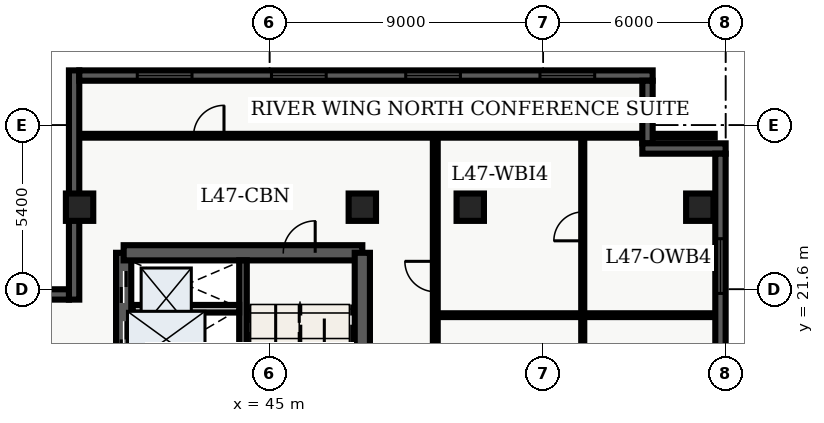
"""IFC4 building model, lengths in metres.
Left out: names, types, materials, properties, quantities, classifications, styles, units other than length and angle.
Written with IfcOpenShell. Run it as: python <this file> out.ifc"""

import sys

from ifc_helpers import new_model, entity, si_unit, converted_unit, direction, frame, origin_with_axes, origin_2d_with_axis, place, context, subcontext, project, spatial, polyline, rectangle, outline, extrude, element, fill, save


model = new_model("IFC4")
c1 = context("Model", 3, precision=1e-05, world=origin_with_axes(), true_north=direction((0.0, 1.0)))
c2 = subcontext(c1, "Body", "Model", "MODEL_VIEW")
j1 = project(units=[si_unit("LENGTHUNIT", "METRE"), converted_unit("PLANEANGLEUNIT", "DEGREE", entity("IfcPlaneAngleMeasure", 0.017), si_unit("PLANEANGLEUNIT", "RADIAN"), dimensions=[0, 0, 0, 0, 0, 0, 0])], contexts=[c1])
p1 = place(None, origin_with_axes())
s1 = spatial("IfcSite", under=j1, at=p1, CompositionType="ELEMENT")
p2 = place(p1, origin_with_axes())
s2 = spatial("IfcBuilding", under=s1, at=p2, CompositionType="ELEMENT")
p3 = place(p2, frame((0.0, 0.0, 192.6), z_axis=(0.0, 0.0, 1.0), x_axis=(1.0, 0.0, 0.0)))
s3 = spatial("IfcBuildingStorey", under=s2, at=p3, CompositionType="ELEMENT", Elevation=192.6)
p4 = place(p3, frame((40.2, 7.2, 0.0), z_axis=(0.0, 0.0, 1.0), x_axis=(0.0, 1.0, 0.0)))
e1 = element("IfcWall", 1, at=p4, inside=s3, PredefinedType="SHEAR", context=c2, shape_type="SweptSolid", body=[
    extrude(outline(polyline([(0.0, -0.25), (15.6, -0.25), (15.6, 0.25), (0.0, 0.25), (0.0, -0.25)])), origin_with_axes(), (0.0, 0.0, 1.0), 3.66),
])
p5 = place(p4, frame((14.475, 0.0, 0.0), z_axis=(0.0, 0.0, 1.0), x_axis=(1.0, 0.0, 0.0)))
e2 = element("IfcOpeningElement", 2, at=p5, cuts=e1, PredefinedType="OPENING", context=c2, shape_type="SweptSolid", body=[
    extrude(rectangle(XDim=1.05, YDim=0.52, at=origin_2d_with_axis()), origin_with_axes(), (0.0, 0.0, 1.0), 2.15),
])
p6 = place(p4, frame((12.75, 0.0, 0.0), z_axis=(0.0, 0.0, 1.0), x_axis=(1.0, 0.0, 0.0)))
e3 = element("IfcOpeningElement", 3, at=p6, cuts=e1, PredefinedType="OPENING", context=c2, shape_type="SweptSolid", body=[
    extrude(rectangle(XDim=1.2, YDim=0.52, at=origin_2d_with_axis()), origin_with_axes(), (0.0, 0.0, 1.0), 2.15),
])
p7 = place(p4, frame((9.3, 0.0, 0.0), z_axis=(0.0, 0.0, 1.0), x_axis=(1.0, 0.0, 0.0)))
e4 = element("IfcOpeningElement", 4, at=p7, cuts=e1, PredefinedType="OPENING", context=c2, shape_type="SweptSolid", body=[
    extrude(rectangle(XDim=0.9, YDim=0.52, at=origin_2d_with_axis()), origin_with_axes(), (0.0, 0.0, 1.0), 2.15),
])
p8 = place(p3, frame((40.2, 22.8, 0.0), z_axis=(0.0, 0.0, 1.0), x_axis=(1.0, 0.0, 0.0)))
e5 = element("IfcWall", 5, at=p8, inside=s3, PredefinedType="SHEAR", context=c2, shape_type="SweptSolid", body=[
    extrude(outline(polyline([(0.0, -0.25), (7.85, -0.25), (7.85, 0.25), (0.0, 0.25), (0.0, -0.25)])), origin_with_axes(), (0.0, 0.0, 1.0), 3.66),
])
p9 = place(p8, frame((5.775, 0.0, 0.0), z_axis=(0.0, 0.0, 1.0), x_axis=(1.0, 0.0, 0.0)))
e6 = element("IfcOpeningElement", 6, at=p9, cuts=e5, PredefinedType="OPENING", context=c2, shape_type="SweptSolid", body=[
    extrude(rectangle(XDim=1.05, YDim=0.52, at=origin_2d_with_axis()), origin_with_axes(), (0.0, 0.0, 1.0), 2.15),
])
p10 = place(p3, frame((48.05, 7.2, 0.0), z_axis=(0.0, 0.0, 1.0), x_axis=(0.0, 1.0, 0.0)))
e7 = element("IfcWall", 7, at=p10, inside=s3, PredefinedType="SHEAR", context=c2, shape_type="SweptSolid", body=[
    extrude(outline(polyline([(0.0, -0.25), (15.6, -0.25), (15.6, 0.25), (0.0, 0.25), (0.0, -0.25)])), origin_with_axes(), (0.0, 0.0, 1.0), 3.66),
])
p11 = place(p10, frame((5.975, 0.0, 0.0), z_axis=(0.0, 0.0, 1.0), x_axis=(1.0, 0.0, 0.0)))
e8 = element("IfcOpeningElement", 8, at=p11, cuts=e7, PredefinedType="OPENING", context=c2, shape_type="SweptSolid", body=[
    extrude(rectangle(XDim=1.05, YDim=0.52, at=origin_2d_with_axis()), origin_with_axes(), (0.0, 0.0, 1.0), 2.15),
])
p12 = place(p10, frame((2.725, 0.0, 0.0), z_axis=(0.0, 0.0, 1.0), x_axis=(1.0, 0.0, 0.0)))
e9 = element("IfcOpeningElement", 9, at=p12, cuts=e7, PredefinedType="OPENING", context=c2, shape_type="SweptSolid", body=[
    extrude(rectangle(XDim=0.95, YDim=0.52, at=origin_2d_with_axis()), origin_with_axes(), (0.0, 0.0, 1.0), 2.15),
])
p13 = place(p3, frame((44.125, 7.45, 0.0), z_axis=(0.0, 0.0, 1.0), x_axis=(0.0, 1.0, 0.0)))
e10 = element("IfcWall", 10, at=p13, inside=s3, PredefinedType="SHEAR", context=c2, shape_type="SweptSolid", body=[
    extrude(outline(polyline([(0.0, -0.125), (15.1, -0.125), (15.1, 0.125), (0.0, 0.125), (0.0, -0.125)])), origin_with_axes(), (0.0, 0.0, 1.0), 3.66),
])
for number, where, z_axis, x_axis in (
    (11, (38.75, 24.3, 0.0), (0.0, 0.0, 1.0), (1.0, 0.0, 0.0)),
    (12, (48.05, 24.3, 0.0), (0.0, 0.0, 1.0), (1.0, 0.0, 0.0)),
    (13, (51.6, 24.3, 0.0), (0.0, 0.0, 1.0), (1.0, 0.0, 0.0)),
    (14, (59.15, 24.3, 0.0), (0.0, 0.0, 1.0), (1.0, 0.0, 0.0)),
):
    element("IfcColumn", number, at=place(p3, frame(where, z_axis=z_axis, x_axis=x_axis)), inside=s3, PredefinedType="COLUMN", context=c2, shape_type="SweptSolid", body=[
        extrude(rectangle(XDim=0.9, YDim=0.9, at=origin_2d_with_axis()), origin_with_axes(), (0.0, 0.0, 1.0), 3.9),
    ])
p14 = place(p3, frame((40.5, 20.96, 0.0), z_axis=(0.0, 0.0, 1.0), x_axis=(1.0, 0.0, 0.0)))
e15 = element("IfcWall", 15, at=p14, inside=s3, PredefinedType="SOLIDWALL", context=c2, shape_type="SweptSolid", body=[
    extrude(outline(polyline([(0.0, -0.125), (3.5, -0.125), (3.5, 0.125), (0.0, 0.125), (0.0, -0.125)])), origin_with_axes(), (0.0, 0.0, 1.0), 2.7),
])
p15 = place(p3, frame((50.45, 7.85, 0.0), z_axis=(0.0, 0.0, 1.0), x_axis=(0.0, 1.0, 0.0)))
e16 = element("IfcWall", 16, at=p15, inside=s3, PredefinedType="PARTITIONING", context=c2, shape_type="SweptSolid", body=[
    extrude(outline(polyline([(0.0, -0.08), (18.8, -0.08), (18.8, 0.08), (0.0, 0.08), (0.0, -0.08)])), origin_with_axes(), (0.0, 0.0, 1.0), 2.7),
])
p16 = place(p15, frame((5.84, 0.0, 0.0), z_axis=(0.0, 0.0, 1.0), x_axis=(1.0, 0.0, 0.0)))
e17 = element("IfcOpeningElement", 17, at=p16, cuts=e16, PredefinedType="OPENING", context=c2, shape_type="SweptSolid", body=[
    extrude(rectangle(XDim=1.0, YDim=0.18, at=origin_2d_with_axis()), origin_with_axes(), (0.0, 0.0, 1.0), 2.15),
])
p17 = place(p15, frame((11.293, 0.0, 0.0), z_axis=(0.0, 0.0, 1.0), x_axis=(1.0, 0.0, 0.0)))
e18 = element("IfcOpeningElement", 18, at=p17, cuts=e16, PredefinedType="OPENING", context=c2, shape_type="SweptSolid", body=[
    extrude(rectangle(XDim=1.0, YDim=0.18, at=origin_2d_with_axis()), origin_with_axes(), (0.0, 0.0, 1.0), 2.15),
])
p18 = place(p15, frame((14.169, 0.0, 0.0), z_axis=(0.0, 0.0, 1.0), x_axis=(1.0, 0.0, 0.0)))
e19 = element("IfcOpeningElement", 19, at=p18, cuts=e16, PredefinedType="OPENING", context=c2, shape_type="SweptSolid", body=[
    extrude(rectangle(XDim=1.0, YDim=0.18, at=origin_2d_with_axis()), origin_with_axes(), (0.0, 0.0, 1.0), 2.15),
])
p19 = place(p3, frame((38.735, 26.65, 0.0), z_axis=(0.0, 0.0, 1.0), x_axis=(1.0, 0.0, 0.0)))
e20 = element("IfcWall", 20, at=p19, inside=s3, PredefinedType="PARTITIONING", context=c2, shape_type="SweptSolid", body=[
    extrude(outline(polyline([(0.0, -0.062), (20.905, -0.062), (20.905, 0.062), (0.0, 0.062), (0.0, -0.062)])), origin_with_axes(), (0.0, 0.0, 1.0), 2.7),
])
p20 = place(p19, frame((4.265, 0.0, 0.0), z_axis=(0.0, 0.0, 1.0), x_axis=(1.0, 0.0, 0.0)))
e21 = element("IfcOpeningElement", 21, at=p20, cuts=e20, PredefinedType="OPENING", context=c2, shape_type="SweptSolid", body=[
    extrude(rectangle(XDim=1.0, YDim=0.145, at=origin_2d_with_axis()), origin_with_axes(), (0.0, 0.0, 1.0), 2.15),
])
p21 = place(p3, frame((55.3, 7.98, 0.0), z_axis=(0.0, 0.0, 1.0), x_axis=(0.0, 1.0, 0.0)))
e22 = element("IfcWall", 22, at=p21, inside=s3, PredefinedType="PARTITIONING", context=c2, shape_type="SweptSolid", body=[
    extrude(outline(polyline([(0.0, -0.05), (18.54, -0.05), (18.54, 0.05), (0.0, 0.05), (0.0, -0.05)])), origin_with_axes(), (0.0, 0.0, 1.0), 2.7),
])
p22 = place(p21, frame((1.776, 0.0, 0.0), z_axis=(0.0, 0.0, 1.0), x_axis=(1.0, 0.0, 0.0)))
e23 = element("IfcOpeningElement", 23, at=p22, cuts=e22, PredefinedType="OPENING", context=c2, shape_type="SweptSolid", body=[
    extrude(rectangle(XDim=0.95, YDim=0.12, at=origin_2d_with_axis()), origin_with_axes(), (0.0, 0.0, 1.0), 2.15),
])
p23 = place(p21, frame((5.71, 0.0, 0.0), z_axis=(0.0, 0.0, 1.0), x_axis=(1.0, 0.0, 0.0)))
e24 = element("IfcOpeningElement", 24, at=p23, cuts=e22, PredefinedType="OPENING", context=c2, shape_type="SweptSolid", body=[
    extrude(rectangle(XDim=0.95, YDim=0.12, at=origin_2d_with_axis()), origin_with_axes(), (0.0, 0.0, 1.0), 2.15),
])
p24 = place(p21, frame((10.283, 0.0, 0.0), z_axis=(0.0, 0.0, 1.0), x_axis=(1.0, 0.0, 0.0)))
e25 = element("IfcOpeningElement", 25, at=p24, cuts=e22, PredefinedType="OPENING", context=c2, shape_type="SweptSolid", body=[
    extrude(rectangle(XDim=0.95, YDim=0.12, at=origin_2d_with_axis()), origin_with_axes(), (0.0, 0.0, 1.0), 2.15),
])
p25 = place(p21, frame((15.689, 0.0, 0.0), z_axis=(0.0, 0.0, 1.0), x_axis=(1.0, 0.0, 0.0)))
e26 = element("IfcOpeningElement", 26, at=p25, cuts=e22, PredefinedType="OPENING", context=c2, shape_type="SweptSolid", body=[
    extrude(rectangle(XDim=0.95, YDim=0.12, at=origin_2d_with_axis()), origin_with_axes(), (0.0, 0.0, 1.0), 2.15),
])
p26 = place(p3, frame((50.57, 20.748, 0.0), z_axis=(0.0, 0.0, 1.0), x_axis=(1.0, 0.0, 0.0)))
e27 = element("IfcWall", 27, at=p26, inside=s3, PredefinedType="PARTITIONING", context=c2, shape_type="SweptSolid", body=[
    extrude(outline(polyline([(0.0, -0.062), (9.095, -0.062), (9.095, 0.062), (0.0, 0.062), (0.0, -0.062)])), origin_with_axes(), (0.0, 0.0, 1.0), 2.7),
])
p27 = place(p3, frame((38.57, 21.26, 0.0), z_axis=(0.0, 0.0, 1.0), x_axis=(0.0, 1.0, 0.0)))
e28 = element("IfcWall", 28, at=p27, inside=s3, PredefinedType="SOLIDWALL", context=c2, shape_type="SweptSolid", body=[
    extrude(outline(polyline([(0.0, -0.17), (7.54, -0.17), (7.54, 0.17), (0.0, 0.17), (0.0, -0.17)])), origin_with_axes(), (0.0, 0.0, 1.0), 3.66),
])
p28 = place(p3, frame((38.74, 28.63, 0.0), z_axis=(0.0, 0.0, 1.0), x_axis=(1.0, 0.0, 0.0)))
e29 = element("IfcWall", 29, at=p28, inside=s3, PredefinedType="SOLIDWALL", context=c2, shape_type="SweptSolid", body=[
    extrude(outline(polyline([(0.0, -0.17), (18.86, -0.17), (18.86, 0.17), (0.0, 0.17), (0.0, -0.17)])), origin_with_axes(), (0.0, 0.0, 1.0), 3.66),
])
p29 = place(p28, frame((2.808, 0.0, 0.45), z_axis=(0.0, 0.0, 1.0), x_axis=(1.0, 0.0, 0.0)))
e30 = element("IfcOpeningElement", 30, at=p29, cuts=e29, PredefinedType="OPENING", context=c2, shape_type="SweptSolid", body=[
    extrude(rectangle(XDim=1.8, YDim=0.36, at=origin_2d_with_axis()), origin_with_axes(), (0.0, 0.0, 1.0), 2.1),
])
p30 = place(p28, frame((7.222, 0.0, 0.45), z_axis=(0.0, 0.0, 1.0), x_axis=(1.0, 0.0, 0.0)))
e31 = element("IfcOpeningElement", 31, at=p30, cuts=e29, PredefinedType="OPENING", context=c2, shape_type="SweptSolid", body=[
    extrude(rectangle(XDim=1.8, YDim=0.36, at=origin_2d_with_axis()), origin_with_axes(), (0.0, 0.0, 1.0), 2.1),
])
p31 = place(p28, frame((11.637, 0.0, 0.45), z_axis=(0.0, 0.0, 1.0), x_axis=(1.0, 0.0, 0.0)))
e32 = element("IfcOpeningElement", 32, at=p31, cuts=e29, PredefinedType="OPENING", context=c2, shape_type="SweptSolid", body=[
    extrude(rectangle(XDim=1.8, YDim=0.36, at=origin_2d_with_axis()), origin_with_axes(), (0.0, 0.0, 1.0), 2.1),
])
p32 = place(p28, frame((16.053, 0.0, 0.45), z_axis=(0.0, 0.0, 1.0), x_axis=(1.0, 0.0, 0.0)))
e33 = element("IfcOpeningElement", 33, at=p32, cuts=e29, PredefinedType="OPENING", context=c2, shape_type="SweptSolid", body=[
    extrude(rectangle(XDim=1.8, YDim=0.36, at=origin_2d_with_axis()), origin_with_axes(), (0.0, 0.0, 1.0), 2.1),
])
p33 = place(p3, frame((57.43, 28.46, 0.0), z_axis=(0.0, 0.0, 1.0), x_axis=(0.0, -1.0, 0.0)))
e34 = element("IfcWall", 34, at=p33, inside=s3, PredefinedType="SOLIDWALL", context=c2, shape_type="SweptSolid", body=[
    extrude(outline(polyline([(0.0, -0.17), (2.06, -0.17), (2.06, 0.17), (0.0, 0.17), (0.0, -0.17)])), origin_with_axes(), (0.0, 0.0, 1.0), 3.66),
])
p34 = place(p3, frame((57.26, 26.23, 0.0), z_axis=(0.0, 0.0, 1.0), x_axis=(1.0, 0.0, 0.0)))
e35 = element("IfcWall", 35, at=p34, inside=s3, PredefinedType="SOLIDWALL", context=c2, shape_type="SweptSolid", body=[
    extrude(outline(polyline([(0.0, -0.17), (2.74, -0.17), (2.74, 0.17), (0.0, 0.17), (0.0, -0.17)])), origin_with_axes(), (0.0, 0.0, 1.0), 3.66),
])
p35 = place(p3, frame((59.83, 26.06, 0.0), z_axis=(0.0, 0.0, 1.0), x_axis=(0.0, -1.0, 0.0)))
e36 = element("IfcWall", 36, at=p35, inside=s3, PredefinedType="SOLIDWALL", context=c2, shape_type="SweptSolid", body=[
    extrude(outline(polyline([(0.0, -0.17), (23.66, -0.17), (23.66, 0.17), (0.0, 0.17), (0.0, -0.17)])), origin_with_axes(), (0.0, 0.0, 1.0), 3.66),
])
p36 = place(p35, frame((3.696, 0.0, 0.45), z_axis=(0.0, 0.0, 1.0), x_axis=(1.0, 0.0, 0.0)))
e37 = element("IfcOpeningElement", 37, at=p36, cuts=e36, PredefinedType="OPENING", context=c2, shape_type="SweptSolid", body=[
    extrude(rectangle(XDim=1.8, YDim=0.36, at=origin_2d_with_axis()), origin_with_axes(), (0.0, 0.0, 1.0), 2.1),
])
p37 = place(p35, frame((11.83, 0.0, 0.45), z_axis=(0.0, 0.0, 1.0), x_axis=(1.0, 0.0, 0.0)))
e38 = element("IfcOpeningElement", 38, at=p37, cuts=e36, PredefinedType="OPENING", context=c2, shape_type="SweptSolid", body=[
    extrude(rectangle(XDim=1.8, YDim=0.36, at=origin_2d_with_axis()), origin_with_axes(), (0.0, 0.0, 1.0), 2.1),
])
p38 = place(p35, frame((20.364, 0.0, 0.45), z_axis=(0.0, 0.0, 1.0), x_axis=(1.0, 0.0, 0.0)))
e39 = element("IfcOpeningElement", 39, at=p38, cuts=e36, PredefinedType="OPENING", context=c2, shape_type="SweptSolid", body=[
    extrude(rectangle(XDim=1.8, YDim=0.36, at=origin_2d_with_axis()), origin_with_axes(), (0.0, 0.0, 1.0), 2.1),
])
p39 = place(p3, frame((27.341, 21.43, 0.0), z_axis=(0.0, 0.0, 1.0), x_axis=(1.0, 0.0, 0.0)))
e40 = element("IfcWall", 40, at=p39, inside=s3, PredefinedType="SOLIDWALL", context=c2, shape_type="SweptSolid", body=[
    extrude(outline(polyline([(0.0, -0.17), (11.059, -0.17), (11.059, 0.17), (0.0, 0.17), (0.0, -0.17)])), origin_with_axes(), (0.0, 0.0, 1.0), 3.66),
])
p40 = place(p39, frame((3.065, 0.0, 0.45), z_axis=(0.0, 0.0, 1.0), x_axis=(1.0, 0.0, 0.0)))
e41 = element("IfcOpeningElement", 41, at=p40, cuts=e40, PredefinedType="OPENING", context=c2, shape_type="SweptSolid", body=[
    extrude(rectangle(XDim=1.8, YDim=0.36, at=origin_2d_with_axis()), origin_with_axes(), (0.0, 0.0, 1.0), 2.1),
])
p41 = place(p39, frame((7.544, 0.0, 0.45), z_axis=(0.0, 0.0, 1.0), x_axis=(1.0, 0.0, 0.0)))
e42 = element("IfcOpeningElement", 42, at=p41, cuts=e40, PredefinedType="OPENING", context=c2, shape_type="SweptSolid", body=[
    extrude(rectangle(XDim=1.8, YDim=0.36, at=origin_2d_with_axis()), origin_with_axes(), (0.0, 0.0, 1.0), 2.1),
])
p42 = place(p4, frame((14.475, 0.0, 0.0), z_axis=(0.0, 0.0, 1.0), x_axis=(1.0, 0.0, 0.0)))
e43 = element("IfcDoor", 43, at=p42, inside=s3, OperationType="SLIDING_TO_RIGHT", PredefinedType="DOOR", context=c2, shape_type="SweptSolid", body=[
    extrude(rectangle(XDim=1.05, YDim=0.09, at=origin_2d_with_axis()), origin_with_axes(), (0.0, 0.0, 1.0), 2.15),
])
fill(e2, e43)
p43 = place(p4, frame((12.75, 0.0, 0.0), z_axis=(0.0, 0.0, 1.0), x_axis=(1.0, 0.0, 0.0)))
e44 = element("IfcDoor", 44, at=p43, inside=s3, OperationType="DOUBLE_DOOR_SLIDING", PredefinedType="DOOR", context=c2, shape_type="SweptSolid", body=[
    extrude(rectangle(XDim=1.2, YDim=0.09, at=origin_2d_with_axis()), origin_with_axes(), (0.0, 0.0, 1.0), 2.15),
])
fill(e3, e44)
p44 = place(p8, frame((5.775, 0.0, 0.0), z_axis=(0.0, 0.0, 1.0), x_axis=(1.0, 0.0, 0.0)))
e45 = element("IfcDoor", 45, at=p44, inside=s3, OperationType="SINGLE_SWING_RIGHT", PredefinedType="DOOR", context=c2, shape_type="SweptSolid", body=[
    extrude(rectangle(XDim=1.05, YDim=0.09, at=origin_2d_with_axis()), origin_with_axes(), (0.0, 0.0, 1.0), 2.15),
])
fill(e6, e45)
p45 = place(p19, frame((4.265, 0.0, 0.0), z_axis=(0.0, 0.0, 1.0), x_axis=(1.0, 0.0, 0.0)))
e46 = element("IfcDoor", 46, at=p45, inside=s3, OperationType="SINGLE_SWING_RIGHT", PredefinedType="DOOR", context=c2, shape_type="SweptSolid", body=[
    extrude(rectangle(XDim=1.0, YDim=0.075, at=origin_2d_with_axis()), origin_with_axes(), (0.0, 0.0, 1.0), 2.15),
])
fill(e21, e46)
p46 = place(p21, frame((15.689, 0.0, 0.0), z_axis=(0.0, 0.0, 1.0), x_axis=(1.0, 0.0, 0.0)))
e47 = element("IfcDoor", 47, at=p46, inside=s3, OperationType="SINGLE_SWING_LEFT", PredefinedType="DOOR", context=c2, shape_type="SweptSolid", body=[
    extrude(rectangle(XDim=0.95, YDim=0.06, at=origin_2d_with_axis()), origin_with_axes(), (0.0, 0.0, 1.0), 2.15),
])
fill(e26, e47)
p47 = place(p15, frame((14.169, 0.0, 0.0), z_axis=(0.0, 0.0, 1.0), x_axis=(1.0, 0.0, 0.0)))
e48 = element("IfcDoor", 48, at=p47, inside=s3, OperationType="SINGLE_SWING_RIGHT", PredefinedType="DOOR", context=c2, shape_type="SweptSolid", body=[
    extrude(rectangle(XDim=1.0, YDim=0.09, at=origin_2d_with_axis()), origin_with_axes(), (0.0, 0.0, 1.0), 2.15),
])
fill(e19, e48)
p48 = place(p28, frame((2.808, 0.0, 0.45), z_axis=(0.0, 0.0, 1.0), x_axis=(1.0, 0.0, 0.0)))
e49 = element("IfcWindow", 49, at=p48, inside=s3, PredefinedType="WINDOW", context=c2, shape_type="SweptSolid", body=[
    extrude(rectangle(XDim=1.8, YDim=0.09, at=origin_2d_with_axis()), origin_with_axes(), (0.0, 0.0, 1.0), 2.1),
])
fill(e30, e49)
p49 = place(p28, frame((7.222, 0.0, 0.45), z_axis=(0.0, 0.0, 1.0), x_axis=(1.0, 0.0, 0.0)))
e50 = element("IfcWindow", 50, at=p49, inside=s3, PredefinedType="WINDOW", context=c2, shape_type="SweptSolid", body=[
    extrude(rectangle(XDim=1.8, YDim=0.09, at=origin_2d_with_axis()), origin_with_axes(), (0.0, 0.0, 1.0), 2.1),
])
fill(e31, e50)
p50 = place(p28, frame((11.637, 0.0, 0.45), z_axis=(0.0, 0.0, 1.0), x_axis=(1.0, 0.0, 0.0)))
e51 = element("IfcWindow", 51, at=p50, inside=s3, PredefinedType="WINDOW", context=c2, shape_type="SweptSolid", body=[
    extrude(rectangle(XDim=1.8, YDim=0.09, at=origin_2d_with_axis()), origin_with_axes(), (0.0, 0.0, 1.0), 2.1),
])
fill(e32, e51)
p51 = place(p28, frame((16.053, 0.0, 0.45), z_axis=(0.0, 0.0, 1.0), x_axis=(1.0, 0.0, 0.0)))
e52 = element("IfcWindow", 52, at=p51, inside=s3, PredefinedType="WINDOW", context=c2, shape_type="SweptSolid", body=[
    extrude(rectangle(XDim=1.8, YDim=0.09, at=origin_2d_with_axis()), origin_with_axes(), (0.0, 0.0, 1.0), 2.1),
])
fill(e33, e52)
p52 = place(p35, frame((3.696, 0.0, 0.45), z_axis=(0.0, 0.0, 1.0), x_axis=(1.0, 0.0, 0.0)))
e53 = element("IfcWindow", 53, at=p52, inside=s3, PredefinedType="WINDOW", context=c2, shape_type="SweptSolid", body=[
    extrude(rectangle(XDim=1.8, YDim=0.09, at=origin_2d_with_axis()), origin_with_axes(), (0.0, 0.0, 1.0), 2.1),
])
fill(e37, e53)
save(model, sys.argv[1])
